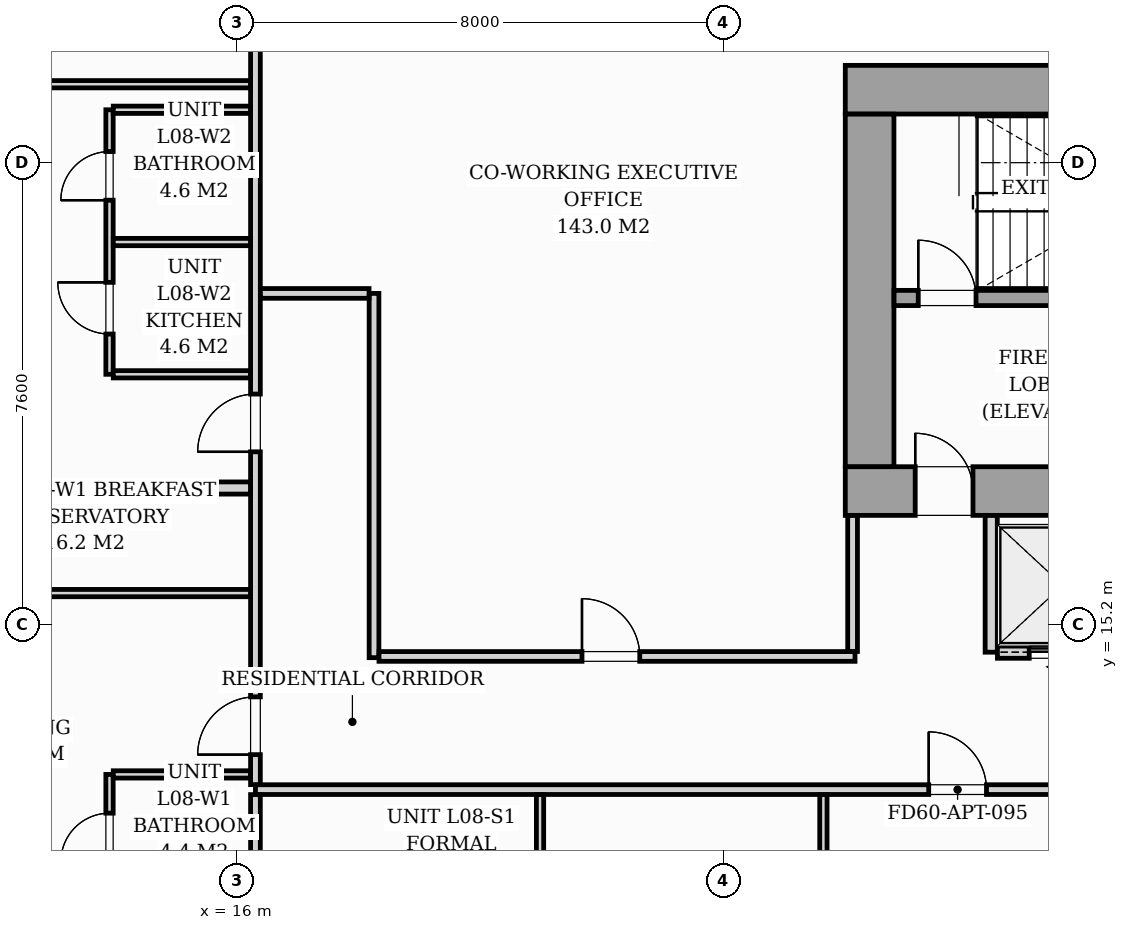
"""IFC4 building model, lengths in metres.
Left out: names, types, materials, properties, quantities, classifications, styles, units other than length and angle.
Written with IfcOpenShell. Run it as: python <this file> out.ifc"""

import sys

from ifc_helpers import new_model, si_unit, direction, frame, frame_2d, origin, origin_2d, place, context, subcontext, project, spatial, rectangle, i_section, extrude, source, transform, mapped, element, fill, save


model = new_model("IFC4")
c1 = context("Model", 3, precision=1e-05, world=origin(), true_north=direction((0.0, 1.0)))
c2 = subcontext(c1, "Body", "Model", "MODEL_VIEW")
j1 = project(units=[si_unit("LENGTHUNIT", "METRE"), si_unit("PLANEANGLEUNIT", "RADIAN")], contexts=[c1])
p1 = place(None, origin())
s1 = spatial("IfcSite", under=j1, at=p1, CompositionType="ELEMENT")
p2 = place(p1, origin())
s2 = spatial("IfcBuilding", under=s1, at=p2, CompositionType="ELEMENT")
p3 = place(p2, frame((0.0, 0.0, 32.6)))
s3 = spatial("IfcBuildingStorey", under=s2, at=p3, CompositionType="ELEMENT", Elevation=32.6)
m1 = source(origin(), c2, "Body", "SweptSolid", [
    extrude(i_section(OverallWidth=0.437, OverallDepth=0.514, WebThickness=0.061, FlangeThickness=0.097, FilletRadius=0.018, at=origin_2d()), origin(), (0.0, 0.0, 1.0), 3.196),
])
for number, where, z_axis, x_axis in (
    (1, (26.4, 17.4, 0.002), (0.0, 0.0, 1.0), (1.0, 0.0, 0.0)),
    (2, (26.4, 24.0, 0.002), (0.0, 0.0, 1.0), (1.0, 0.0, 0.0)),
):
    element("IfcColumn", number, at=place(p3, frame(where, z_axis=z_axis, x_axis=x_axis)), inside=s3, PredefinedType="PILASTER", context=c2, shape_type="MappedRepresentation", body=[
        mapped(m1, transform((0.0, 0.0, 0.0), scale=1.0)),
    ])
p4 = place(p3, frame((26.0, 17.4, 0.0), z_axis=(0.0, 0.0, 1.0), x_axis=(1.0, 0.0, 0.0)))
e3 = element("IfcWall", 3, at=p4, inside=s3, PredefinedType="SHEAR", context=c2, shape_type="SweptSolid", body=[
    extrude(rectangle(XDim=20.0, YDim=0.8, at=frame_2d((10.0, 0.0))), origin(), (0.0, 0.0, 1.0), 3.2),
])
p5 = place(p4, frame((1.15, 0.0, 0.0)))
e4 = element("IfcOpeningElement", 4, at=p5, cuts=e3, PredefinedType="OPENING", context=c2, shape_type="SweptSolid", body=[
    extrude(rectangle(XDim=0.95, YDim=2.06, at=frame_2d((0.475, 1.03))), frame((0.0, 0.41, 0.0), z_axis=(0.0, -1.0, 0.0), x_axis=(1.0, 0.0, 0.0)), (0.0, 0.0, 1.0), 0.82),
])
p6 = place(p4, frame((9.58, 0.0, 0.0)))
e5 = element("IfcOpeningElement", 5, at=p6, cuts=e3, PredefinedType="OPENING", context=c2, shape_type="SweptSolid", body=[
    extrude(rectangle(XDim=0.85, YDim=2.0, at=frame_2d((0.425, 1.0))), frame((0.0, 0.41, 0.0), z_axis=(0.0, -1.0, 0.0), x_axis=(1.0, 0.0, 0.0)), (0.0, 0.0, 1.0), 0.82),
])
p7 = place(p4, frame((17.75, 0.0, 0.0)))
e6 = element("IfcOpeningElement", 6, at=p7, cuts=e3, PredefinedType="OPENING", context=c2, shape_type="SweptSolid", body=[
    extrude(rectangle(XDim=0.95, YDim=2.06, at=frame_2d((0.475, 1.03))), frame((0.0, 0.41, 0.0), z_axis=(0.0, -1.0, 0.0), x_axis=(1.0, 0.0, 0.0)), (0.0, 0.0, 1.0), 0.82),
])
p8 = place(p3, frame((26.0, 24.0, 0.0), z_axis=(0.0, 0.0, 1.0), x_axis=(1.0, 0.0, 0.0)))
e7 = element("IfcWall", 7, at=p8, inside=s3, PredefinedType="SHEAR", context=c2, shape_type="SweptSolid", body=[
    extrude(rectangle(XDim=20.0, YDim=0.8, at=frame_2d((10.0, 0.0))), origin(), (0.0, 0.0, 1.0), 3.2),
])
p9 = place(p3, frame((26.4, 17.802, 0.0), z_axis=(0.0, 0.0, 1.0), x_axis=(0.0, 1.0, 0.0)))
e8 = element("IfcWall", 8, at=p9, inside=s3, PredefinedType="SHEAR", context=c2, shape_type="SweptSolid", body=[
    extrude(rectangle(XDim=5.796, YDim=0.8, at=frame_2d((2.898, 0.0))), origin(), (0.0, 0.0, 1.0), 3.2),
])
p10 = place(p3, frame((26.802, 20.575, 0.0), z_axis=(0.0, 0.0, 1.0), x_axis=(1.0, 0.0, 0.0)))
e9 = element("IfcWall", 9, at=p10, inside=s3, PredefinedType="SOLIDWALL", context=c2, shape_type="SweptSolid", body=[
    extrude(rectangle(XDim=8.148, YDim=0.25, at=frame_2d((4.074, 0.0))), origin(), (0.0, 0.0, 1.0), 3.2),
])
p11 = place(p10, frame((0.398, 0.0, 0.0)))
e10 = element("IfcOpeningElement", 10, at=p11, cuts=e9, PredefinedType="OPENING", context=c2, shape_type="SweptSolid", body=[
    extrude(rectangle(XDim=0.95, YDim=2.06, at=frame_2d((0.475, 1.03))), frame((0.0, 0.135, 0.0), z_axis=(0.0, -1.0, 0.0), x_axis=(1.0, 0.0, 0.0)), (0.0, 0.0, 1.0), 0.27),
])
p12 = place(p3, frame((28.4, 14.75, 0.0), z_axis=(0.0, 0.0, 1.0), x_axis=(0.0, 1.0, 0.0)))
e11 = element("IfcWall", 11, at=p12, inside=s3, PredefinedType="PARTITIONING", context=c2, shape_type="SweptSolid", body=[
    extrude(rectangle(XDim=2.248, YDim=0.2, at=frame_2d((1.124, 0.0))), origin(), (0.0, 0.0, 1.0), 2.94),
])
p13 = place(p3, frame((28.502, 14.75, 0.0), z_axis=(0.0, 0.0, 1.0), x_axis=(1.0, 0.0, 0.0)))
e12 = element("IfcWall", 12, at=p13, inside=s3, PredefinedType="PARTITIONING", context=c2, shape_type="SweptSolid", body=[
    extrude(rectangle(XDim=2.146, YDim=0.2, at=frame_2d((1.073, 0.0))), origin(), (0.0, 0.0, 1.0), 2.94),
])
p14 = place(p13, frame((0.523, 0.0, 0.0)))
e13 = element("IfcOpeningElement", 13, at=p14, cuts=e12, PredefinedType="OPENING", context=c2, shape_type="SweptSolid", body=[
    extrude(rectangle(XDim=1.05, YDim=2.08, at=frame_2d((0.525, 1.04))), frame((0.0, 0.11, 0.0), z_axis=(0.0, -1.0, 0.0), x_axis=(1.0, 0.0, 0.0)), (0.0, 0.0, 1.0), 0.22),
])
p15 = place(p3, frame((16.3, 12.49, 0.0), z_axis=(0.0, 0.0, 1.0), x_axis=(1.0, 0.0, 0.0)))
e14 = element("IfcWall", 14, at=p15, inside=s3, PredefinedType="PARTITIONING", context=c2, shape_type="SweptSolid", body=[
    extrude(rectangle(XDim=35.2, YDim=0.16, at=frame_2d((17.6, 0.0))), origin(), (0.0, 0.0, 1.0), 2.94),
])
p16 = place(p15, frame((11.072, 0.0, 0.0)))
e15 = element("IfcOpeningElement", 15, at=p16, cuts=e14, PredefinedType="OPENING", context=c2, shape_type="SweptSolid", body=[
    extrude(rectangle(XDim=0.95, YDim=2.06, at=frame_2d((0.475, 1.03))), frame((0.0, 0.09, 0.0), z_axis=(0.0, -1.0, 0.0), x_axis=(1.0, 0.0, 0.0)), (0.0, 0.0, 1.0), 0.18),
])
p17 = place(p15, frame((24.032, 0.0, 0.0)))
e16 = element("IfcOpeningElement", 16, at=p17, cuts=e14, PredefinedType="OPENING", context=c2, shape_type="SweptSolid", body=[
    extrude(rectangle(XDim=0.95, YDim=2.06, at=frame_2d((0.475, 1.03))), frame((0.0, 0.09, 0.0), z_axis=(0.0, -1.0, 0.0), x_axis=(1.0, 0.0, 0.0)), (0.0, 0.0, 1.0), 0.18),
])
p18 = place(p3, frame((16.3, 2.962, 0.0), z_axis=(0.0, 0.0, 1.0), x_axis=(0.0, 1.0, 0.0)))
e17 = element("IfcWall", 17, at=p18, inside=s3, PredefinedType="PARTITIONING", context=c2, shape_type="SweptSolid", body=[
    extrude(rectangle(XDim=9.446, YDim=0.16, at=frame_2d((4.723, 0.0))), origin(), (0.0, 0.0, 1.0), 2.94),
])
p19 = place(p3, frame((16.3, 12.572, 0.0), z_axis=(0.0, 0.0, 1.0), x_axis=(0.0, 1.0, 0.0)))
e18 = element("IfcWall", 18, at=p19, inside=s3, PredefinedType="PARTITIONING", context=c2, shape_type="SweptSolid", body=[
    extrude(rectangle(XDim=14.866, YDim=0.16, at=frame_2d((7.433, 0.0))), origin(), (0.0, 0.0, 1.0), 2.94),
])
p20 = place(p19, frame((0.493, 0.0, 0.0)))
e19 = element("IfcOpeningElement", 19, at=p20, cuts=e18, PredefinedType="OPENING", context=c2, shape_type="SweptSolid", body=[
    extrude(rectangle(XDim=0.95, YDim=2.06, at=frame_2d((0.475, 1.03))), frame((0.0, 0.09, 0.0), z_axis=(0.0, -1.0, 0.0), x_axis=(1.0, 0.0, 0.0)), (0.0, 0.0, 1.0), 0.18),
])
p21 = place(p19, frame((5.473, 0.0, 0.0)))
e20 = element("IfcOpeningElement", 20, at=p21, cuts=e18, PredefinedType="OPENING", context=c2, shape_type="SweptSolid", body=[
    extrude(rectangle(XDim=0.95, YDim=2.06, at=frame_2d((0.475, 1.03))), frame((0.0, 0.09, 0.0), z_axis=(0.0, -1.0, 0.0), x_axis=(1.0, 0.0, 0.0)), (0.0, 0.0, 1.0), 0.18),
])
p22 = place(p3, frame((20.98, 2.962, 0.0), z_axis=(0.0, 0.0, 1.0), x_axis=(0.0, 1.0, 0.0)))
e21 = element("IfcWall", 21, at=p22, inside=s3, PredefinedType="PARTITIONING", context=c2, shape_type="SweptSolid", body=[
    extrude(rectangle(XDim=9.446, YDim=0.12, at=frame_2d((4.723, 0.0))), origin(), (0.0, 0.0, 1.0), 2.94),
])
p23 = place(p22, frame((4.288, 0.0, 0.0)))
e22 = element("IfcOpeningElement", 22, at=p23, cuts=e21, PredefinedType="OPENING", context=c2, shape_type="SweptSolid", body=[
    extrude(rectangle(XDim=0.85, YDim=2.05, at=frame_2d((0.425, 1.025))), frame((0.0, 0.07, 0.0), z_axis=(0.0, -1.0, 0.0), x_axis=(1.0, 0.0, 0.0)), (0.0, 0.0, 1.0), 0.14),
])
p24 = place(p3, frame((25.64, 2.78, 0.0), z_axis=(0.0, 0.0, 1.0), x_axis=(0.0, 1.0, 0.0)))
e23 = element("IfcWall", 23, at=p24, inside=s3, PredefinedType="PARTITIONING", context=c2, shape_type="SweptSolid", body=[
    extrude(rectangle(XDim=9.628, YDim=0.12, at=frame_2d((4.814, 0.0))), origin(), (0.0, 0.0, 1.0), 2.94),
])
p25 = place(p24, frame((4.47, 0.0, 0.0)))
e24 = element("IfcOpeningElement", 24, at=p25, cuts=e23, PredefinedType="OPENING", context=c2, shape_type="SweptSolid", body=[
    extrude(rectangle(XDim=0.85, YDim=2.05, at=frame_2d((0.425, 1.025))), frame((0.0, 0.07, 0.0), z_axis=(0.0, -1.0, 0.0), x_axis=(1.0, 0.0, 0.0)), (0.0, 0.0, 1.0), 0.14),
])
p26 = place(p3, frame((5.88, 17.45, 0.0), z_axis=(0.0, 0.0, 1.0), x_axis=(1.0, 0.0, 0.0)))
e25 = element("IfcWall", 25, at=p26, inside=s3, PredefinedType="PARTITIONING", context=c2, shape_type="SweptSolid", body=[
    extrude(rectangle(XDim=10.338, YDim=0.2, at=frame_2d((5.169, 0.0))), origin(), (0.0, 0.0, 1.0), 2.94),
])
p27 = place(p3, frame((13.9, 8.59, 0.0), z_axis=(0.0, 0.0, 1.0), x_axis=(0.0, 1.0, 0.0)))
e26 = element("IfcWall", 26, at=p27, inside=s3, PredefinedType="PARTITIONING", context=c2, shape_type="SweptSolid", body=[
    extrude(rectangle(XDim=4.15, YDim=0.12, at=frame_2d((2.075, 0.0))), origin(), (0.0, 0.0, 1.0), 2.94),
])
p28 = place(p27, frame((0.612, 0.0, 0.0)))
e27 = element("IfcOpeningElement", 27, at=p28, cuts=e26, PredefinedType="OPENING", context=c2, shape_type="SweptSolid", body=[
    extrude(rectangle(XDim=0.85, YDim=2.05, at=frame_2d((0.425, 1.025))), frame((0.0, 0.07, 0.0), z_axis=(0.0, -1.0, 0.0), x_axis=(1.0, 0.0, 0.0)), (0.0, 0.0, 1.0), 0.14),
])
p29 = place(p27, frame((2.713, 0.0, 0.0)))
e28 = element("IfcOpeningElement", 28, at=p29, cuts=e26, PredefinedType="OPENING", context=c2, shape_type="SweptSolid", body=[
    extrude(rectangle(XDim=0.8, YDim=2.02, at=frame_2d((0.4, 1.01))), frame((0.0, 0.07, 0.0), z_axis=(0.0, -1.0, 0.0), x_axis=(1.0, 0.0, 0.0)), (0.0, 0.0, 1.0), 0.14),
])
p30 = place(p3, frame((13.962, 12.74, 0.0), z_axis=(0.0, 0.0, 1.0), x_axis=(1.0, 0.0, 0.0)))
e29 = element("IfcWall", 29, at=p30, inside=s3, PredefinedType="PARTITIONING", context=c2, shape_type="SweptSolid", body=[
    extrude(rectangle(XDim=2.256, YDim=0.12, at=frame_2d((1.128, 0.0))), origin(), (0.0, 0.0, 1.0), 2.94),
])
p31 = place(p3, frame((5.88, 15.722, 0.0), z_axis=(0.0, 0.0, 1.0), x_axis=(1.0, 0.0, 0.0)))
e30 = element("IfcWall", 30, at=p31, inside=s3, PredefinedType="PARTITIONING", context=c2, shape_type="SweptSolid", body=[
    extrude(rectangle(XDim=10.338, YDim=0.12, at=frame_2d((5.169, 0.0))), origin(), (0.0, 0.0, 1.0), 2.045),
])
p32 = place(p31, frame((4.735, 0.0, 0.0)))
e31 = element("IfcOpeningElement", 31, at=p32, cuts=e30, PredefinedType="OPENING", context=c2, shape_type="SweptSolid", body=[
    extrude(rectangle(XDim=0.85, YDim=2.01, at=frame_2d((0.425, 1.005))), frame((0.0, 0.07, 0.0), z_axis=(0.0, -1.0, 0.0), x_axis=(1.0, 0.0, 0.0)), (0.0, 0.0, 1.0), 0.14),
])
p33 = place(p3, frame((13.9, 19.32, 0.0), z_axis=(0.0, 0.0, 1.0), x_axis=(0.0, 1.0, 0.0)))
e32 = element("IfcWall", 32, at=p33, inside=s3, PredefinedType="PARTITIONING", context=c2, shape_type="SweptSolid", body=[
    extrude(rectangle(XDim=4.35, YDim=0.12, at=frame_2d((2.175, 0.0))), origin(), (0.0, 0.0, 1.0), 2.94),
])
p34 = place(p33, frame((0.662, 0.0, 0.0)))
e33 = element("IfcOpeningElement", 33, at=p34, cuts=e32, PredefinedType="OPENING", context=c2, shape_type="SweptSolid", body=[
    extrude(rectangle(XDim=0.85, YDim=2.05, at=frame_2d((0.425, 1.025))), frame((0.0, 0.07, 0.0), z_axis=(0.0, -1.0, 0.0), x_axis=(1.0, 0.0, 0.0)), (0.0, 0.0, 1.0), 0.14),
])
p35 = place(p33, frame((2.863, 0.0, 0.0)))
e34 = element("IfcOpeningElement", 34, at=p35, cuts=e32, PredefinedType="OPENING", context=c2, shape_type="SweptSolid", body=[
    extrude(rectangle(XDim=0.8, YDim=2.02, at=frame_2d((0.4, 1.01))), frame((0.0, 0.07, 0.0), z_axis=(0.0, -1.0, 0.0), x_axis=(1.0, 0.0, 0.0)), (0.0, 0.0, 1.0), 0.14),
])
for number, where, z_axis, x_axis in (
    (35, (13.962, 21.495, 0.0), (0.0, 0.0, 1.0), (1.0, 0.0, 0.0)),
    (36, (13.962, 19.32, 0.0), (0.0, 0.0, 1.0), (1.0, 0.0, 0.0)),
    (37, (13.962, 23.67, 0.0), (0.0, 0.0, 1.0), (1.0, 0.0, 0.0)),
):
    element("IfcWall", number, at=place(p3, frame(where, z_axis=z_axis, x_axis=x_axis)), inside=s3, PredefinedType="PARTITIONING", context=c2, shape_type="SweptSolid", body=[
        extrude(rectangle(XDim=2.256, YDim=0.12, at=frame_2d((1.128, 0.0))), origin(), (0.0, 0.0, 1.0), 2.94),
    ])
p36 = place(p3, frame((5.88, 24.09, 0.0), z_axis=(0.0, 0.0, 1.0), x_axis=(1.0, 0.0, 0.0)))
e38 = element("IfcWall", 38, at=p36, inside=s3, PredefinedType="PARTITIONING", context=c2, shape_type="SweptSolid", body=[
    extrude(rectangle(XDim=10.338, YDim=0.12, at=frame_2d((5.169, 0.0))), origin(), (0.0, 0.0, 1.0), 2.94),
])
p37 = place(p36, frame((4.735, 0.0, 0.0)))
e39 = element("IfcOpeningElement", 39, at=p37, cuts=e38, PredefinedType="OPENING", context=c2, shape_type="SweptSolid", body=[
    extrude(rectangle(XDim=0.85, YDim=2.05, at=frame_2d((0.425, 1.025))), frame((0.0, 0.07, 0.0), z_axis=(0.0, -1.0, 0.0), x_axis=(1.0, 0.0, 0.0)), (0.0, 0.0, 1.0), 0.14),
])
p38 = place(p3, frame((18.25, 14.66, 0.0), z_axis=(0.0, 0.0, 1.0), x_axis=(0.0, 1.0, 0.0)))
e40 = element("IfcWall", 40, at=p38, inside=s3, PredefinedType="PARTITIONING", context=c2, shape_type="SweptSolid", body=[
    extrude(rectangle(XDim=5.99, YDim=0.16, at=frame_2d((2.995, 0.0))), origin(), (0.0, 0.0, 1.0), 2.94),
])
p39 = place(p3, frame((16.382, 20.65, 0.0), z_axis=(0.0, 0.0, 1.0), x_axis=(1.0, 0.0, 0.0)))
e41 = element("IfcWall", 41, at=p39, inside=s3, PredefinedType="PARTITIONING", context=c2, shape_type="SweptSolid", body=[
    extrude(rectangle(XDim=1.786, YDim=0.16, at=frame_2d((0.893, 0.0))), origin(), (0.0, 0.0, 1.0), 2.94),
])
p40 = place(p3, frame((18.332, 14.68, 0.0), z_axis=(0.0, 0.0, 1.0), x_axis=(1.0, 0.0, 0.0)))
e42 = element("IfcWall", 42, at=p40, inside=s3, PredefinedType="PARTITIONING", context=c2, shape_type="SweptSolid", body=[
    extrude(rectangle(XDim=7.828, YDim=0.16, at=frame_2d((3.914, 0.0))), origin(), (0.0, 0.0, 1.0), 2.94),
])
p41 = place(p40, frame((3.338, 0.0, 0.0)))
e43 = element("IfcOpeningElement", 43, at=p41, cuts=e42, PredefinedType="OPENING", context=c2, shape_type="SweptSolid", body=[
    extrude(rectangle(XDim=0.95, YDim=2.06, at=frame_2d((0.475, 1.03))), frame((0.0, 0.09, 0.0), z_axis=(0.0, -1.0, 0.0), x_axis=(1.0, 0.0, 0.0)), (0.0, 0.0, 1.0), 0.18),
])
p42 = place(p3, frame((26.12, 14.762, 0.0), z_axis=(0.0, 0.0, 1.0), x_axis=(0.0, 1.0, 0.0)))
e44 = element("IfcWall", 44, at=p42, inside=s3, PredefinedType="PARTITIONING", context=c2, shape_type="SweptSolid", body=[
    extrude(rectangle(XDim=2.236, YDim=0.16, at=frame_2d((1.118, 0.0))), origin(), (0.0, 0.0, 1.0), 2.94),
])
m2 = source(origin(), c2, "Body", "SweptSolid", [
    extrude(rectangle(XDim=0.95, YDim=2.06, at=frame_2d((0.475, 1.03))), frame((0.0, 0.025, 0.0), z_axis=(0.0, -1.0, 0.0), x_axis=(1.0, 0.0, 0.0)), (0.0, 0.0, 1.0), 0.05),
])
p43 = place(p5, origin())
e45 = element("IfcDoor", 45, at=p43, inside=s3, OperationType="SINGLE_SWING_LEFT", PredefinedType="DOOR", context=c2, shape_type="MappedRepresentation", body=[
    mapped(m2, transform((0.0, 0.0, 0.0), scale=1.0)),
])
fill(e4, e45)
p44 = place(p11, origin())
e46 = element("IfcDoor", 46, at=p44, inside=s3, OperationType="SINGLE_SWING_LEFT", PredefinedType="DOOR", context=c2, shape_type="MappedRepresentation", body=[
    mapped(m2, transform((0.0, 0.0, 0.0), scale=1.0)),
])
fill(e10, e46)
m3 = source(origin(), c2, "Body", "SweptSolid", [
    extrude(rectangle(XDim=1.05, YDim=2.08, at=frame_2d((0.525, 1.04))), frame((0.0, 0.025, 0.0), z_axis=(0.0, -1.0, 0.0), x_axis=(1.0, 0.0, 0.0)), (0.0, 0.0, 1.0), 0.05),
])
p45 = place(p14, origin())
e47 = element("IfcDoor", 47, at=p45, inside=s3, OperationType="SLIDING_TO_LEFT", PredefinedType="DOOR", context=c2, shape_type="MappedRepresentation", body=[
    mapped(m3, transform((0.0, 0.0, 0.0), scale=1.0)),
])
fill(e13, e47)
m4 = source(origin(), c2, "Body", "SweptSolid", [
    extrude(rectangle(XDim=0.95, YDim=2.06, at=frame_2d((0.475, 1.03))), frame((0.0, 0.025, 0.0), z_axis=(0.0, -1.0, 0.0), x_axis=(1.0, 0.0, 0.0)), (0.0, 0.0, 1.0), 0.05),
])
p46 = place(p16, origin())
e48 = element("IfcDoor", 48, at=p46, inside=s3, OperationType="SINGLE_SWING_LEFT", PredefinedType="DOOR", context=c2, shape_type="MappedRepresentation", body=[
    mapped(m4, transform((0.0, 0.0, 0.0), scale=1.0)),
])
fill(e15, e48)
p47 = place(p20, origin())
e49 = element("IfcDoor", 49, at=p47, inside=s3, OperationType="SINGLE_SWING_LEFT", PredefinedType="DOOR", context=c2, shape_type="MappedRepresentation", body=[
    mapped(m4, transform((0.0, 0.0, 0.0), scale=1.0)),
])
fill(e19, e49)
m5 = source(origin(), c2, "Body", "SweptSolid", [
    extrude(rectangle(XDim=0.8, YDim=2.02, at=frame_2d((0.4, 1.01))), frame((0.0, 0.025, 0.0), z_axis=(0.0, -1.0, 0.0), x_axis=(1.0, 0.0, 0.0)), (0.0, 0.0, 1.0), 0.05),
])
p48 = place(p29, origin())
e50 = element("IfcDoor", 50, at=p48, inside=s3, OperationType="SINGLE_SWING_LEFT", PredefinedType="DOOR", context=c2, shape_type="MappedRepresentation", body=[
    mapped(m5, transform((0.0, 0.0, 0.0), scale=1.0)),
])
fill(e28, e50)
p49 = place(p21, origin())
e51 = element("IfcDoor", 51, at=p49, inside=s3, OperationType="SINGLE_SWING_LEFT", PredefinedType="DOOR", context=c2, shape_type="MappedRepresentation", body=[
    mapped(m4, transform((0.0, 0.0, 0.0), scale=1.0)),
])
fill(e20, e51)
m6 = source(origin(), c2, "Body", "SweptSolid", [
    extrude(rectangle(XDim=0.85, YDim=2.05, at=frame_2d((0.425, 1.025))), frame((0.0, 0.025, 0.0), z_axis=(0.0, -1.0, 0.0), x_axis=(1.0, 0.0, 0.0)), (0.0, 0.0, 1.0), 0.05),
])
p50 = place(p34, origin())
e52 = element("IfcDoor", 52, at=p50, inside=s3, OperationType="SINGLE_SWING_RIGHT", PredefinedType="DOOR", context=c2, shape_type="MappedRepresentation", body=[
    mapped(m6, transform((0.0, 0.0, 0.0), scale=1.0)),
])
fill(e33, e52)
p51 = place(p35, origin())
e53 = element("IfcDoor", 53, at=p51, inside=s3, OperationType="SINGLE_SWING_LEFT", PredefinedType="DOOR", context=c2, shape_type="MappedRepresentation", body=[
    mapped(m5, transform((0.0, 0.0, 0.0), scale=1.0)),
])
fill(e34, e53)
p52 = place(p41, origin())
e54 = element("IfcDoor", 54, at=p52, inside=s3, OperationType="SINGLE_SWING_LEFT", PredefinedType="DOOR", context=c2, shape_type="MappedRepresentation", body=[
    mapped(m4, transform((0.0, 0.0, 0.0), scale=1.0)),
])
fill(e43, e54)
save(model, sys.argv[1])
